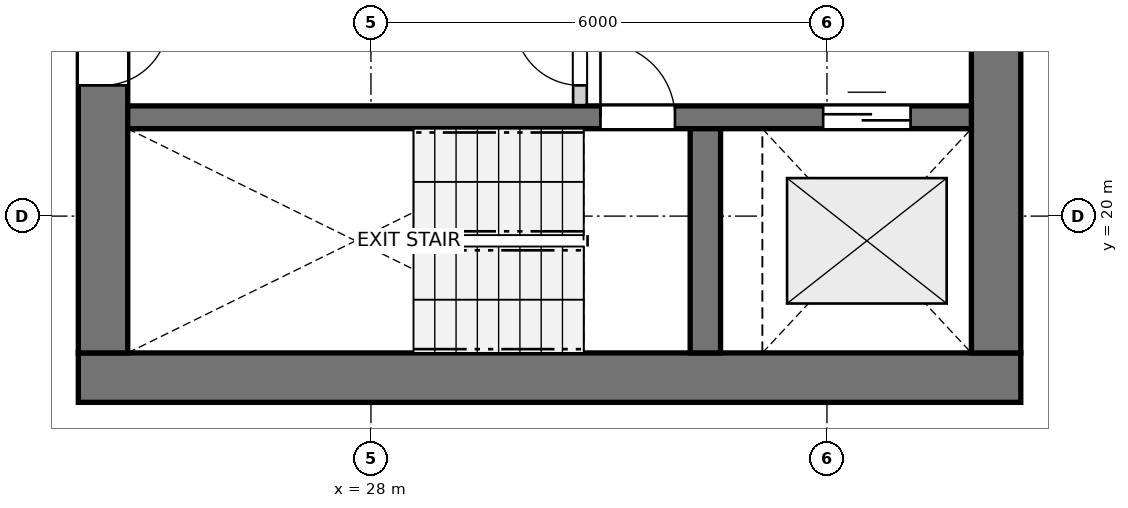
"""IFC4 building model, lengths in metres.
Left out: names, types, materials, properties, quantities, classifications, styles, units other than length and angle.
Written with IfcOpenShell. Run it as: python <this file> out.ifc"""

import sys

from ifc_helpers import new_model, si_unit, direction, frame, frame_2d, origin, place, context, subcontext, project, spatial, rectangle, extrude, source, transform, mapped, element, fill, save


model = new_model("IFC4")
c1 = context("Model", 3, precision=1e-05, world=origin(), true_north=direction((0.0, 1.0)))
c2 = subcontext(c1, "Body", "Model", "MODEL_VIEW")
j1 = project(units=[si_unit("LENGTHUNIT", "METRE"), si_unit("PLANEANGLEUNIT", "RADIAN")], contexts=[c1])
p1 = place(None, origin())
s1 = spatial("IfcSite", under=j1, at=p1, CompositionType="ELEMENT")
p2 = place(p1, origin())
s2 = spatial("IfcBuilding", under=s1, at=p2, CompositionType="ELEMENT")
p3 = place(p2, frame((0.0, 0.0, 105.6)))
s3 = spatial("IfcBuildingStorey", under=s2, at=p3, CompositionType="ELEMENT", Elevation=105.6)
p4 = place(p3, frame((24.15, 17.875, 0.0), z_axis=(0.0, 0.0, 1.0), x_axis=(1.0, 0.0, 0.0)))
e1 = element("IfcWall", 1, at=p4, inside=s3, PredefinedType="SHEAR", context=c2, shape_type="SweptSolid", body=[
    extrude(rectangle(XDim=12.4, YDim=0.65, at=frame_2d((6.2, 0.0))), origin(), (0.0, 0.0, 1.0), 2.935),
])
p5 = place(p3, frame((24.475, 33.8, 0.0), z_axis=(0.0, 0.0, 1.0), x_axis=(0.0, -1.0, 0.0)))
e2 = element("IfcWall", 2, at=p5, inside=s3, PredefinedType="SHEAR", context=c2, shape_type="SweptSolid", body=[
    extrude(rectangle(XDim=15.6, YDim=0.65, at=frame_2d((7.8, 0.0))), origin(), (0.0, 0.0, 1.0), 2.935),
])
p6 = place(p5, frame((7.05, 0.0, 0.0)))
e3 = element("IfcOpeningElement", 3, at=p6, cuts=e2, PredefinedType="OPENING", context=c2, shape_type="SweptSolid", body=[
    extrude(rectangle(XDim=1.5, YDim=2.15, at=frame_2d((0.75, 1.075))), frame((0.0, 0.335, 0.0), z_axis=(0.0, -1.0, 0.0), x_axis=(1.0, 0.0, 0.0)), (0.0, 0.0, 1.0), 0.67),
])
p7 = place(p5, frame((3.52, 0.0, 0.0)))
e4 = element("IfcOpeningElement", 4, at=p7, cuts=e2, PredefinedType="OPENING", context=c2, shape_type="SweptSolid", body=[
    extrude(rectangle(XDim=0.86, YDim=2.05, at=frame_2d((0.43, 1.025))), frame((0.0, 0.335, 0.0), z_axis=(0.0, -1.0, 0.0), x_axis=(1.0, 0.0, 0.0)), (0.0, 0.0, 1.0), 0.67),
])
p8 = place(p5, frame((11.22, 0.0, 0.0)))
e5 = element("IfcOpeningElement", 5, at=p8, cuts=e2, PredefinedType="OPENING", context=c2, shape_type="SweptSolid", body=[
    extrude(rectangle(XDim=0.86, YDim=2.05, at=frame_2d((0.43, 1.025))), frame((0.0, 0.335, 0.0), z_axis=(0.0, -1.0, 0.0), x_axis=(1.0, 0.0, 0.0)), (0.0, 0.0, 1.0), 0.67),
])
p9 = place(p3, frame((36.225, 18.2, 0.0), z_axis=(0.0, 0.0, 1.0), x_axis=(0.0, 1.0, 0.0)))
e6 = element("IfcWall", 6, at=p9, inside=s3, PredefinedType="SHEAR", context=c2, shape_type="SweptSolid", body=[
    extrude(rectangle(XDim=15.6, YDim=0.65, at=frame_2d((7.8, 0.0))), origin(), (0.0, 0.0, 1.0), 2.935),
])
p10 = place(p9, frame((4.25, 0.0, 0.0)))
e7 = element("IfcOpeningElement", 7, at=p10, cuts=e6, PredefinedType="OPENING", context=c2, shape_type="SweptSolid", body=[
    extrude(rectangle(XDim=1.1, YDim=2.15, at=frame_2d((0.55, 1.075))), frame((0.0, 0.335, 0.0), z_axis=(0.0, -1.0, 0.0), x_axis=(1.0, 0.0, 0.0)), (0.0, 0.0, 1.0), 0.67),
])
p11 = place(p9, frame((10.25, 0.0, 0.0)))
e8 = element("IfcOpeningElement", 8, at=p11, cuts=e6, PredefinedType="OPENING", context=c2, shape_type="SweptSolid", body=[
    extrude(rectangle(XDim=1.1, YDim=2.15, at=frame_2d((0.55, 1.075))), frame((0.0, 0.335, 0.0), z_axis=(0.0, -1.0, 0.0), x_axis=(1.0, 0.0, 0.0)), (0.0, 0.0, 1.0), 0.67),
])
p12 = place(p3, frame((24.8, 21.3, 0.0), z_axis=(0.0, 0.0, 1.0), x_axis=(1.0, 0.0, 0.0)))
e9 = element("IfcWall", 9, at=p12, inside=s3, PredefinedType="SHEAR", context=c2, shape_type="SweptSolid", body=[
    extrude(rectangle(XDim=11.1, YDim=0.3, at=frame_2d((5.55, 0.0))), origin(), (0.0, 0.0, 1.0), 2.935),
])
p13 = place(p12, frame((6.22, 0.0, 0.0)))
e10 = element("IfcOpeningElement", 10, at=p13, cuts=e9, PredefinedType="OPENING", context=c2, shape_type="SweptSolid", body=[
    extrude(rectangle(XDim=0.98, YDim=2.15, at=frame_2d((0.49, 1.075))), frame((0.0, 0.16, 0.0), z_axis=(0.0, -1.0, 0.0), x_axis=(1.0, 0.0, 0.0)), (0.0, 0.0, 1.0), 0.32),
])
p14 = place(p12, frame((9.15, 0.0, 0.0)))
e11 = element("IfcOpeningElement", 11, at=p14, cuts=e9, PredefinedType="OPENING", context=c2, shape_type="SweptSolid", body=[
    extrude(rectangle(XDim=1.15, YDim=2.15, at=frame_2d((0.575, 1.075))), frame((0.0, 0.16, 0.0), z_axis=(0.0, -1.0, 0.0), x_axis=(1.0, 0.0, 0.0)), (0.0, 0.0, 1.0), 0.32),
])
p15 = place(p3, frame((32.4, 18.2, 0.0), z_axis=(0.0, 0.0, 1.0), x_axis=(0.0, 1.0, 0.0)))
e12 = element("IfcWall", 12, at=p15, inside=s3, PredefinedType="SHEAR", context=c2, shape_type="SweptSolid", body=[
    extrude(rectangle(XDim=2.95, YDim=0.4, at=frame_2d((1.475, 0.0))), origin(), (0.0, 0.0, 1.0), 2.935),
])
p16 = place(p3, frame((30.75, 21.46, 0.0), z_axis=(0.0, 0.0, 1.0), x_axis=(0.0, 1.0, 0.0)))
e13 = element("IfcWall", 13, at=p16, inside=s3, PredefinedType="PARTITIONING", context=c2, shape_type="SweptSolid", body=[
    extrude(rectangle(XDim=3.11, YDim=0.18, at=frame_2d((1.555, 0.0))), origin(), (0.0, 0.0, 1.0), 2.935),
])
p17 = place(p16, frame((0.26, 0.0, 0.0)))
e14 = element("IfcOpeningElement", 14, at=p17, cuts=e13, PredefinedType="OPENING", context=c2, shape_type="SweptSolid", body=[
    extrude(rectangle(XDim=0.86, YDim=2.05, at=frame_2d((0.43, 1.025))), frame((0.0, 0.1, 0.0), z_axis=(0.0, -1.0, 0.0), x_axis=(1.0, 0.0, 0.0)), (0.0, 0.0, 1.0), 0.2),
])
m1 = source(origin(), c2, "Body", "SweptSolid", [
    extrude(rectangle(XDim=0.98, YDim=2.15, at=frame_2d((0.49, 1.075))), frame((0.0, 0.025, 0.0), z_axis=(0.0, -1.0, 0.0), x_axis=(1.0, 0.0, 0.0)), (0.0, 0.0, 1.0), 0.05),
])
p18 = place(p13, origin())
e15 = element("IfcDoor", 15, at=p18, inside=s3, OperationType="SINGLE_SWING_LEFT", PredefinedType="DOOR", context=c2, shape_type="MappedRepresentation", body=[
    mapped(m1, transform((0.0, 0.0, 0.0), x_axis=(1.0, 0.0, 0.0), y_axis=(0.0, 1.0, 0.0), z_axis=(0.0, 0.0, 1.0), scale=1.0)),
])
fill(e10, e15)
m2 = source(origin(), c2, "Body", "SweptSolid", [
    extrude(rectangle(XDim=1.15, YDim=2.15, at=frame_2d((0.575, 1.075))), frame((0.0, 0.025, 0.0), z_axis=(0.0, -1.0, 0.0), x_axis=(1.0, 0.0, 0.0)), (0.0, 0.0, 1.0), 0.05),
])
p19 = place(p14, origin())
e16 = element("IfcDoor", 16, at=p19, inside=s3, OperationType="DOUBLE_DOOR_SLIDING", PredefinedType="DOOR", context=c2, shape_type="MappedRepresentation", body=[
    mapped(m2, transform((0.0, 0.0, 0.0), x_axis=(1.0, 0.0, 0.0), y_axis=(0.0, 1.0, 0.0), z_axis=(0.0, 0.0, 1.0), scale=1.0)),
])
fill(e11, e16)
m3 = source(origin(), c2, "Body", "SweptSolid", [
    extrude(rectangle(XDim=0.86, YDim=2.05, at=frame_2d((0.43, 1.025))), frame((0.0, 0.025, 0.0), z_axis=(0.0, -1.0, 0.0), x_axis=(1.0, 0.0, 0.0)), (0.0, 0.0, 1.0), 0.05),
])
p20 = place(p8, origin())
e17 = element("IfcDoor", 17, at=p20, inside=s3, OperationType="SINGLE_SWING_LEFT", PredefinedType="DOOR", context=c2, shape_type="MappedRepresentation", body=[
    mapped(m3, transform((0.0, 0.0, 0.0), x_axis=(1.0, 0.0, 0.0), y_axis=(0.0, 1.0, 0.0), z_axis=(0.0, 0.0, 1.0), scale=1.0)),
])
fill(e5, e17)
p21 = place(p17, origin())
e18 = element("IfcDoor", 18, at=p21, inside=s3, OperationType="SINGLE_SWING_RIGHT", PredefinedType="DOOR", context=c2, shape_type="MappedRepresentation", body=[
    mapped(m3, transform((0.0, 0.0, 0.0), x_axis=(1.0, 0.0, 0.0), y_axis=(0.0, 1.0, 0.0), z_axis=(0.0, 0.0, 1.0), scale=1.0)),
])
fill(e14, e18)
save(model, sys.argv[1])
